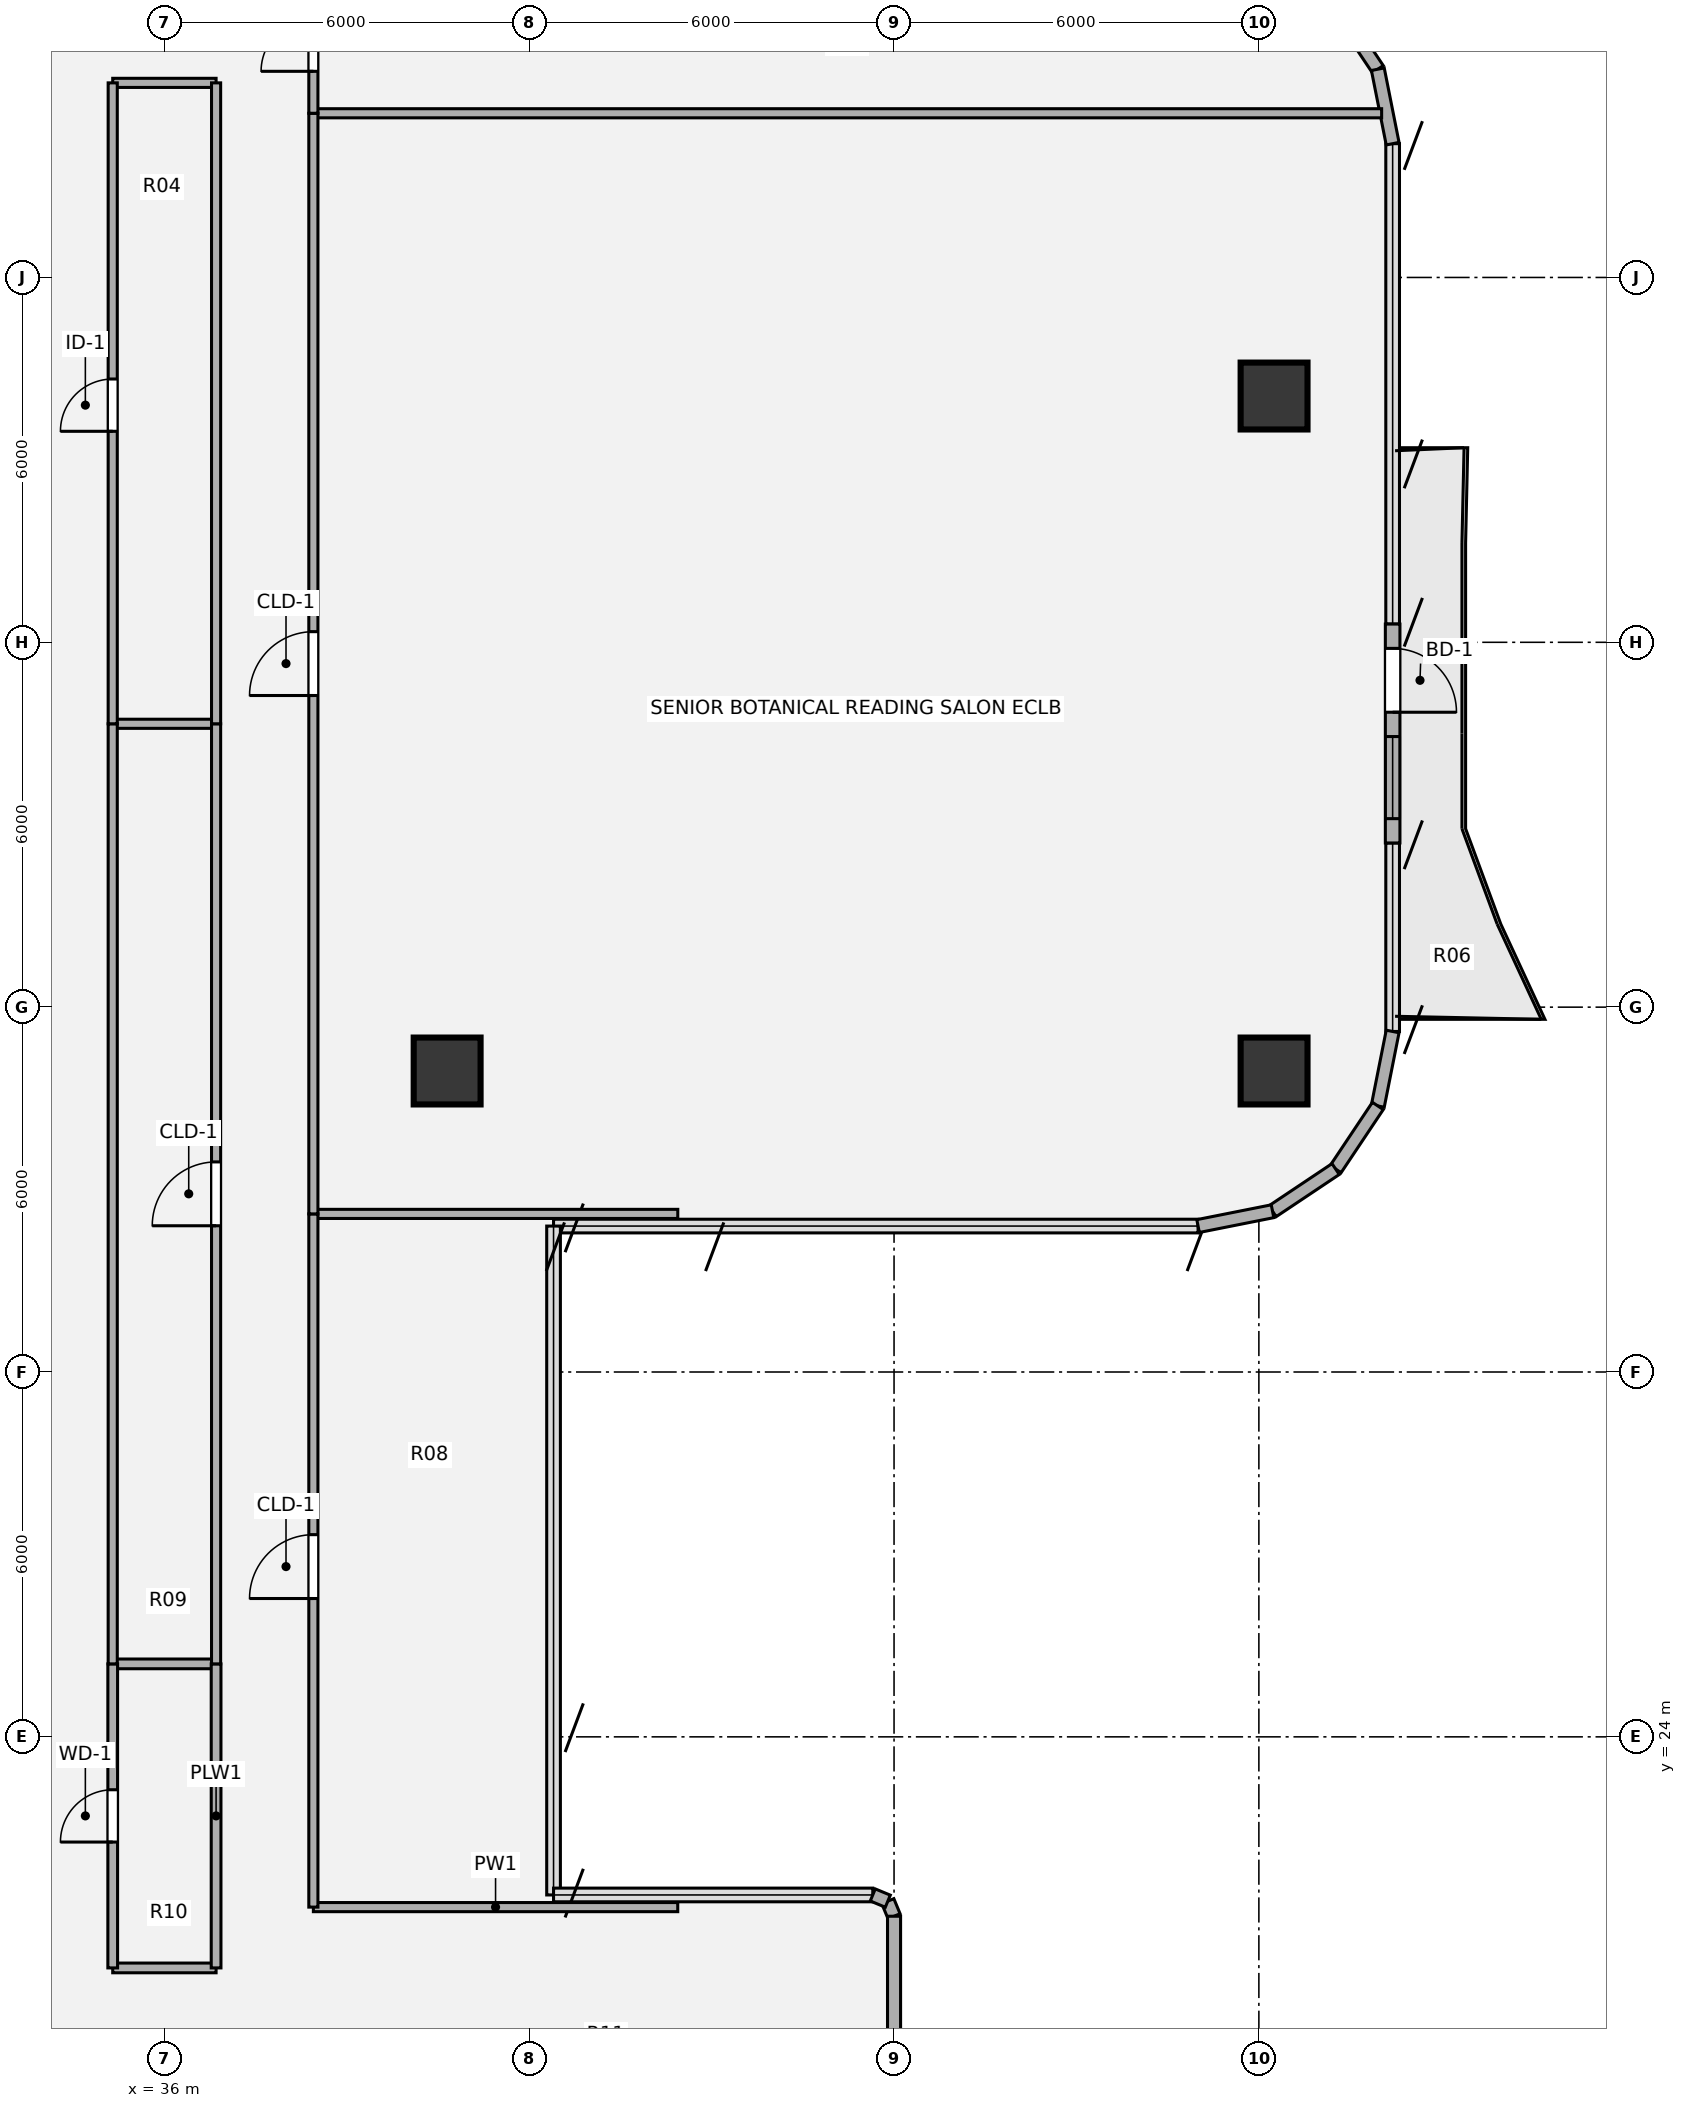
"""IFC4 building model, lengths in metres.
Left out: names, types, materials, properties, quantities, classifications, styles, units other than length and angle.
Written with IfcOpenShell. Run it as: python <this file> out.ifc"""

import sys

from ifc_helpers import new_model, si_unit, direction, frame, frame_2d, origin, origin_2d, place, context, subcontext, project, spatial, rectangle, hollow_circle, extrude, source, transform, mapped, element, fill, save


model = new_model("IFC4")
c1 = context("Model", 3, precision=1e-05, world=origin(), true_north=direction((0.0, 1.0)))
c2 = subcontext(c1, "Body", "Model", "MODEL_VIEW")
j1 = project(units=[si_unit("LENGTHUNIT", "METRE"), si_unit("PLANEANGLEUNIT", "RADIAN")], contexts=[c1])
p1 = place(None, origin())
s1 = spatial("IfcSite", under=j1, at=p1, CompositionType="ELEMENT")
p2 = place(p1, origin())
s2 = spatial("IfcBuilding", under=s1, at=p2, CompositionType="ELEMENT")
p3 = place(p2, frame((0.0, 0.0, 186.66)))
s3 = spatial("IfcBuildingStorey", under=s2, at=p3, CompositionType="ELEMENT", Elevation=186.66)
m1 = source(origin(), c2, "Body", "SweptSolid", [
    extrude(hollow_circle(Radius=0.55, WallThickness=0.04, at=origin_2d()), origin(), (0.0, 0.0, 1.0), 3.78),
])
for number, where, z_axis, x_axis in (
    (1, (54.25, 34.95, 0.0), (0.0, 0.0, 1.0), (1.0, 0.0, 0.0)),
    (2, (54.25, 46.05, 0.0), (0.0, 0.0, 1.0), (1.0, 0.0, 0.0)),
    (3, (40.65, 34.95, 0.0), (0.0, 0.0, 1.0), (1.0, 0.0, 0.0)),
):
    element("IfcColumn", number, at=place(p3, frame(where, z_axis=z_axis, x_axis=x_axis)), inside=s3, PredefinedType="COLUMN", context=c2, shape_type="MappedRepresentation", body=[
        mapped(m1, transform((0.0, 0.0, 0.0), x_axis=(1.0, 0.0, 0.0), y_axis=(0.0, 1.0, 0.0), z_axis=(0.0, 0.0, 1.0), scale=1.0)),
    ])
p4 = place(p3, frame((47.897, 21.298, 0.0), z_axis=(0.0, 0.0, 1.0), x_axis=(0.382673670509, -0.923883575944, 0.0)))
e4 = element("IfcWall", 4, at=p4, inside=s3, PredefinedType="SOLIDWALL", context=c2, shape_type="SweptSolid", body=[
    extrude(rectangle(XDim=0.268, YDim=0.215, at=frame_2d((0.134, 0.0))), origin(), (0.0, 0.0, 1.0), 3.53),
])
p5 = place(p3, frame((48.0, 21.05, 0.0), z_axis=(0.0, 0.0, 1.0), x_axis=(0.0, -1.0, 0.0)))
e5 = element("IfcWall", 5, at=p5, inside=s3, PredefinedType="SOLIDWALL", context=c2, shape_type="SweptSolid", body=[
    extrude(rectangle(XDim=2.695, YDim=0.215, at=frame_2d((1.348, 0.0))), origin(), (0.0, 0.0, 1.0), 2.718),
])
for number, where, z_axis, x_axis in (
    (6, (55.263, 52.463, 0.0), (0.0, 0.0, 1.0), (0.556, -0.831, 0.0)),
    (7, (55.956, 51.425, 0.0), (0.0, 0.0, 1.0), (0.195, -0.981, 0.0)),
):
    element("IfcWall", number, at=place(p3, frame(where, z_axis=z_axis, x_axis=x_axis)), inside=s3, PredefinedType="SOLIDWALL", context=c2, shape_type="SweptSolid", body=[
        extrude(rectangle(XDim=1.249, YDim=0.215, at=frame_2d((0.624, 0.0))), origin(), (0.0, 0.0, 1.0), 3.53),
    ])
p6 = place(p3, frame((56.2, 42.3, 0.0), z_axis=(0.0, 0.0, 1.0), x_axis=(0.0, -1.0, 0.0)))
e8 = element("IfcWall", 8, at=p6, inside=s3, PredefinedType="SOLIDWALL", context=c2, shape_type="SweptSolid", body=[
    extrude(rectangle(XDim=3.6, YDim=0.24, at=frame_2d((1.8, 0.0))), origin(), (0.0, 0.0, 1.0), 3.53),
])
p7 = place(p6, frame((0.4, 0.0, 0.0)))
e9 = element("IfcOpeningElement", 9, at=p7, cuts=e8, PredefinedType="OPENING", context=c2, shape_type="SweptSolid", body=[
    extrude(rectangle(XDim=1.05, YDim=2.15, at=origin_2d()), frame((0.525, 0.13, 1.075), z_axis=(0.0, -1.0, 0.0), x_axis=(1.0, 0.0, 0.0)), (0.0, 0.0, 1.0), 0.26),
])
p8 = place(p6, frame((1.85, 0.0, 0.85)))
e10 = element("IfcOpeningElement", 10, at=p8, cuts=e8, PredefinedType="OPENING", context=c2, shape_type="SweptSolid", body=[
    extrude(rectangle(XDim=1.35, YDim=1.35, at=origin_2d()), frame((0.675, 0.13, 0.675), z_axis=(0.0, -1.0, 0.0), x_axis=(1.0, 0.0, 0.0)), (0.0, 0.0, 1.0), 0.26),
])
for number, where, z_axis, x_axis in (
    (11, (56.2, 35.6, 0.0), (0.0, 0.0, 1.0), (-0.195, -0.981, 0.0)),
    (12, (55.956, 34.375, 0.0), (0.0, 0.0, 1.0), (-0.556, -0.831, 0.0)),
    (13, (55.263, 33.337, 0.0), (0.0, 0.0, 1.0), (-0.831, -0.556, 0.0)),
    (14, (54.225, 32.644, 0.0), (0.0, 0.0, 1.0), (-0.981, -0.195, 0.0)),
):
    element("IfcWall", number, at=place(p3, frame(where, z_axis=z_axis, x_axis=x_axis)), inside=s3, PredefinedType="SOLIDWALL", context=c2, shape_type="SweptSolid", body=[
        extrude(rectangle(XDim=1.249, YDim=0.215, at=frame_2d((0.624, 0.0))), origin(), (0.0, 0.0, 1.0), 3.53),
    ])
p9 = place(p3, frame((47.65, 21.4, 0.0), z_axis=(0.0, 0.0, 1.0), x_axis=(0.924205486139, -0.381895560841, 0.0)))
e15 = element("IfcWall", 15, at=p9, inside=s3, PredefinedType="SOLIDWALL", context=c2, shape_type="SweptSolid", body=[
    extrude(rectangle(XDim=0.268, YDim=0.215, at=frame_2d((0.134, 0.0))), origin(), (0.0, 0.0, 1.0), 3.53),
])
p10 = place(p3, frame((35.15, 20.2, 0.0), z_axis=(0.0, 0.0, 1.0), x_axis=(1.0, 0.0, 0.0)))
e16 = element("IfcWall", 16, at=p10, inside=s3, PredefinedType="PLUMBINGWALL", context=c2, shape_type="SweptSolid", body=[
    extrude(rectangle(XDim=1.7, YDim=0.16, at=frame_2d((0.85, 0.0))), origin(), (0.0, 0.0, 1.0), 3.5),
])
p11 = place(p3, frame((38.45, 21.2, 0.0), z_axis=(0.0, 0.0, 1.0), x_axis=(1.0, 0.0, 0.0)))
e17 = element("IfcWall", 17, at=p11, inside=s3, PredefinedType="PARTITIONING", context=c2, shape_type="SweptSolid", body=[
    extrude(rectangle(XDim=5.993, YDim=0.15, at=frame_2d((2.996, 0.0))), origin(), (0.0, 0.0, 1.0), 3.5),
])
p12 = place(p3, frame((35.15, 25.2, 0.0), z_axis=(0.0, 0.0, 1.0), x_axis=(1.0, 0.0, 0.0)))
e18 = element("IfcWall", 18, at=p12, inside=s3, PredefinedType="PLUMBINGWALL", context=c2, shape_type="SweptSolid", body=[
    extrude(rectangle(XDim=1.7, YDim=0.16, at=frame_2d((0.85, 0.0))), origin(), (0.0, 0.0, 1.0), 3.5),
])
p13 = place(p3, frame((38.45, 32.6, 0.0), z_axis=(0.0, 0.0, 1.0), x_axis=(1.0, 0.0, 0.0)))
e19 = element("IfcWall", 19, at=p13, inside=s3, PredefinedType="PARTITIONING", context=c2, shape_type="SweptSolid", body=[
    extrude(rectangle(XDim=5.993, YDim=0.15, at=frame_2d((2.997, 0.0))), origin(), (0.0, 0.0, 1.0), 3.5),
])
p14 = place(p3, frame((35.15, 40.66, 0.0), z_axis=(0.0, 0.0, 1.0), x_axis=(1.0, 0.0, 0.0)))
e20 = element("IfcWall", 20, at=p14, inside=s3, PredefinedType="PARTITIONING", context=c2, shape_type="SweptSolid", body=[
    extrude(rectangle(XDim=1.7, YDim=0.15, at=frame_2d((0.85, 0.0))), origin(), (0.0, 0.0, 1.0), 3.259),
])
p15 = place(p3, frame((38.45, 50.7, 0.0), z_axis=(0.0, 0.0, 1.0), x_axis=(1.0, 0.0, 0.0)))
e21 = element("IfcWall", 21, at=p15, inside=s3, PredefinedType="PARTITIONING", context=c2, shape_type="SweptSolid", body=[
    extrude(rectangle(XDim=17.569, YDim=0.15, at=frame_2d((8.785, 0.0))), origin(), (0.0, 0.0, 1.0), 3.308),
])
p16 = place(p3, frame((35.15, 51.2, 0.0), z_axis=(0.0, 0.0, 1.0), x_axis=(1.0, 0.0, 0.0)))
e22 = element("IfcWall", 22, at=p16, inside=s3, PredefinedType="PARTITIONING", context=c2, shape_type="SweptSolid", body=[
    extrude(rectangle(XDim=1.7, YDim=0.15, at=frame_2d((0.85, 0.0))), origin(), (0.0, 0.0, 1.0), 3.308),
])
p17 = place(p3, frame((35.15, 20.2, 0.0), z_axis=(0.0, 0.0, 1.0), x_axis=(0.0, 1.0, 0.0)))
e23 = element("IfcWall", 23, at=p17, inside=s3, PredefinedType="PLUMBINGWALL", context=c2, shape_type="SweptSolid", body=[
    extrude(rectangle(XDim=5.0, YDim=0.16, at=frame_2d((2.5, 0.0))), origin(), (0.0, 0.0, 1.0), 3.5),
])
p18 = place(p17, frame((2.07, 0.0, 0.0)))
e24 = element("IfcOpeningElement", 24, at=p18, cuts=e23, PredefinedType="OPENING", context=c2, shape_type="SweptSolid", body=[
    extrude(rectangle(XDim=0.86, YDim=2.1, at=origin_2d()), frame((0.43, 0.09, 1.05), z_axis=(0.0, -1.0, 0.0), x_axis=(1.0, 0.0, 0.0)), (0.0, 0.0, 1.0), 0.18),
])
p19 = place(p3, frame((35.15, 25.2, 0.0), z_axis=(0.0, 0.0, 1.0), x_axis=(0.0, 1.0, 0.0)))
e25 = element("IfcWall", 25, at=p19, inside=s3, PredefinedType="PARTITIONING", context=c2, shape_type="SweptSolid", body=[
    extrude(rectangle(XDim=15.46, YDim=0.15, at=frame_2d((7.73, 0.0))), origin(), (0.0, 0.0, 1.0), 3.5),
])
p20 = place(p3, frame((35.15, 40.66, 0.0), z_axis=(0.0, 0.0, 1.0), x_axis=(0.0, 1.0, 0.0)))
e26 = element("IfcWall", 26, at=p20, inside=s3, PredefinedType="PARTITIONING", context=c2, shape_type="SweptSolid", body=[
    extrude(rectangle(XDim=10.54, YDim=0.15, at=frame_2d((5.27, 0.0))), origin(), (0.0, 0.0, 1.0), 3.5),
])
p21 = place(p20, frame((4.81, 0.0, 0.0)))
e27 = element("IfcOpeningElement", 27, at=p21, cuts=e26, PredefinedType="OPENING", context=c2, shape_type="SweptSolid", body=[
    extrude(rectangle(XDim=0.86, YDim=2.1, at=origin_2d()), frame((0.43, 0.085, 1.05), z_axis=(0.0, -1.0, 0.0), x_axis=(1.0, 0.0, 0.0)), (0.0, 0.0, 1.0), 0.17),
])
p22 = place(p3, frame((36.85, 20.2, 0.0), z_axis=(0.0, 0.0, 1.0), x_axis=(0.0, 1.0, 0.0)))
e28 = element("IfcWall", 28, at=p22, inside=s3, PredefinedType="PLUMBINGWALL", context=c2, shape_type="SweptSolid", body=[
    extrude(rectangle(XDim=5.0, YDim=0.16, at=frame_2d((2.5, 0.0))), origin(), (0.0, 0.0, 1.0), 3.5),
])
p23 = place(p3, frame((36.85, 25.2, 0.0), z_axis=(0.0, 0.0, 1.0), x_axis=(0.0, 1.0, 0.0)))
e29 = element("IfcWall", 29, at=p23, inside=s3, PredefinedType="PARTITIONING", context=c2, shape_type="SweptSolid", body=[
    extrude(rectangle(XDim=15.46, YDim=0.15, at=frame_2d((7.73, 0.0))), origin(), (0.0, 0.0, 1.0), 3.5),
])
p24 = place(p23, frame((7.205, 0.0, 0.0)))
e30 = element("IfcOpeningElement", 30, at=p24, cuts=e29, PredefinedType="OPENING", context=c2, shape_type="SweptSolid", body=[
    extrude(rectangle(XDim=1.05, YDim=2.1, at=origin_2d()), frame((0.525, 0.085, 1.05), z_axis=(0.0, -1.0, 0.0), x_axis=(1.0, 0.0, 0.0)), (0.0, 0.0, 1.0), 0.17),
])
p25 = place(p3, frame((36.85, 40.66, 0.0), z_axis=(0.0, 0.0, 1.0), x_axis=(0.0, 1.0, 0.0)))
e31 = element("IfcWall", 31, at=p25, inside=s3, PredefinedType="PARTITIONING", context=c2, shape_type="SweptSolid", body=[
    extrude(rectangle(XDim=10.54, YDim=0.15, at=frame_2d((5.27, 0.0))), origin(), (0.0, 0.0, 1.0), 3.5),
])
p26 = place(p3, frame((38.45, 21.2, 0.0), z_axis=(0.0, 0.0, 1.0), x_axis=(0.0, 1.0, 0.0)))
e32 = element("IfcWall", 32, at=p26, inside=s3, PredefinedType="PARTITIONING", context=c2, shape_type="SweptSolid", body=[
    extrude(rectangle(XDim=11.4, YDim=0.15, at=frame_2d((5.7, 0.0))), origin(), (0.0, 0.0, 1.0), 3.5),
])
p27 = place(p26, frame((5.075, 0.0, 0.0)))
e33 = element("IfcOpeningElement", 33, at=p27, cuts=e32, PredefinedType="OPENING", context=c2, shape_type="SweptSolid", body=[
    extrude(rectangle(XDim=1.05, YDim=2.1, at=origin_2d()), frame((0.525, 0.085, 1.05), z_axis=(0.0, -1.0, 0.0), x_axis=(1.0, 0.0, 0.0)), (0.0, 0.0, 1.0), 0.17),
])
p28 = place(p3, frame((38.45, 32.6, 0.0), z_axis=(0.0, 0.0, 1.0), x_axis=(0.0, 1.0, 0.0)))
e34 = element("IfcWall", 34, at=p28, inside=s3, PredefinedType="PARTITIONING", context=c2, shape_type="SweptSolid", body=[
    extrude(rectangle(XDim=18.1, YDim=0.15, at=frame_2d((9.05, 0.0))), origin(), (0.0, 0.0, 1.0), 3.5),
])
p29 = place(p28, frame((8.525, 0.0, 0.0)))
e35 = element("IfcOpeningElement", 35, at=p29, cuts=e34, PredefinedType="OPENING", context=c2, shape_type="SweptSolid", body=[
    extrude(rectangle(XDim=1.05, YDim=2.1, at=origin_2d()), frame((0.525, 0.085, 1.05), z_axis=(0.0, -1.0, 0.0), x_axis=(1.0, 0.0, 0.0)), (0.0, 0.0, 1.0), 0.17),
])
p30 = place(p3, frame((38.45, 50.7, 0.0), z_axis=(0.0, 0.0, 1.0), x_axis=(0.0, 1.0, 0.0)))
e36 = element("IfcWall", 36, at=p30, inside=s3, PredefinedType="PARTITIONING", context=c2, shape_type="SweptSolid", body=[
    extrude(rectangle(XDim=2.3, YDim=0.15, at=frame_2d((1.15, 0.0))), origin(), (0.0, 0.0, 1.0), 3.5),
])
p31 = place(p30, frame((0.69, 0.0, 0.0)))
e37 = element("IfcOpeningElement", 37, at=p31, cuts=e36, PredefinedType="OPENING", context=c2, shape_type="SweptSolid", body=[
    extrude(rectangle(XDim=0.86, YDim=2.1, at=origin_2d()), frame((0.43, 0.085, 1.05), z_axis=(0.0, -1.0, 0.0), x_axis=(1.0, 0.0, 0.0)), (0.0, 0.0, 1.0), 0.17),
])
m2 = source(origin(), c2, "Body", "SweptSolid", [
    extrude(rectangle(XDim=1.05, YDim=2.15, at=origin_2d()), frame((0.525, 0.025, 1.075), z_axis=(0.0, -1.0, 0.0), x_axis=(1.0, 0.0, 0.0)), (0.0, 0.0, 1.0), 0.05),
])
p32 = place(p7, origin())
e38 = element("IfcDoor", 38, at=p32, inside=s3, OperationType="SINGLE_SWING_RIGHT", PredefinedType="DOOR", context=c2, shape_type="MappedRepresentation", body=[
    mapped(m2, transform((0.0, 0.0, 0.0), x_axis=(1.0, 0.0, 0.0), y_axis=(0.0, 1.0, 0.0), z_axis=(0.0, 0.0, 1.0), scale=1.0)),
])
fill(e9, e38)
m3 = source(origin(), c2, "Body", "SweptSolid", [
    extrude(rectangle(XDim=1.35, YDim=1.35, at=origin_2d()), frame((0.675, 0.03, 0.675), z_axis=(0.0, -1.0, 0.0), x_axis=(1.0, 0.0, 0.0)), (0.0, 0.0, 1.0), 0.06),
])
p33 = place(p8, origin())
e39 = element("IfcWindow", 39, at=p33, inside=s3, PartitioningType="SINGLE_PANEL", PredefinedType="WINDOW", context=c2, shape_type="MappedRepresentation", body=[
    mapped(m3, transform((0.0, 0.0, 0.0), x_axis=(1.0, 0.0, 0.0), y_axis=(0.0, 1.0, 0.0), z_axis=(0.0, 0.0, 1.0), scale=1.0)),
])
fill(e10, e39)
m4 = source(origin(), c2, "Body", "SweptSolid", [
    extrude(rectangle(XDim=0.86, YDim=2.1, at=origin_2d()), frame((0.43, 0.025, 1.05), z_axis=(0.0, -1.0, 0.0), x_axis=(1.0, 0.0, 0.0)), (0.0, 0.0, 1.0), 0.05),
])
p34 = place(p18, origin())
e40 = element("IfcDoor", 40, at=p34, inside=s3, OperationType="SINGLE_SWING_LEFT", PredefinedType="DOOR", context=c2, shape_type="MappedRepresentation", body=[
    mapped(m4, transform((0.0, 0.0, 0.0), x_axis=(1.0, 0.0, 0.0), y_axis=(0.0, 1.0, 0.0), z_axis=(0.0, 0.0, 1.0), scale=1.0)),
])
fill(e24, e40)
m5 = source(origin(), c2, "Body", "SweptSolid", [
    extrude(rectangle(XDim=0.86, YDim=2.1, at=origin_2d()), frame((0.43, 0.025, 1.05), z_axis=(0.0, -1.0, 0.0), x_axis=(1.0, 0.0, 0.0)), (0.0, 0.0, 1.0), 0.05),
])
p35 = place(p21, origin())
e41 = element("IfcDoor", 41, at=p35, inside=s3, OperationType="SINGLE_SWING_LEFT", PredefinedType="DOOR", context=c2, shape_type="MappedRepresentation", body=[
    mapped(m5, transform((0.0, 0.0, 0.0), x_axis=(1.0, 0.0, 0.0), y_axis=(0.0, 1.0, 0.0), z_axis=(0.0, 0.0, 1.0), scale=1.0)),
])
fill(e27, e41)
m6 = source(origin(), c2, "Body", "SweptSolid", [
    extrude(rectangle(XDim=1.05, YDim=2.1, at=origin_2d()), frame((0.525, 0.025, 1.05), z_axis=(0.0, -1.0, 0.0), x_axis=(1.0, 0.0, 0.0)), (0.0, 0.0, 1.0), 0.05),
])
p36 = place(p24, origin())
e42 = element("IfcDoor", 42, at=p36, inside=s3, OperationType="SINGLE_SWING_LEFT", PredefinedType="DOOR", context=c2, shape_type="MappedRepresentation", body=[
    mapped(m6, transform((0.0, 0.0, 0.0), x_axis=(1.0, 0.0, 0.0), y_axis=(0.0, 1.0, 0.0), z_axis=(0.0, 0.0, 1.0), scale=1.0)),
])
fill(e30, e42)
p37 = place(p27, origin())
e43 = element("IfcDoor", 43, at=p37, inside=s3, OperationType="SINGLE_SWING_LEFT", PredefinedType="DOOR", context=c2, shape_type="MappedRepresentation", body=[
    mapped(m6, transform((0.0, 0.0, 0.0), x_axis=(1.0, 0.0, 0.0), y_axis=(0.0, 1.0, 0.0), z_axis=(0.0, 0.0, 1.0), scale=1.0)),
])
fill(e33, e43)
p38 = place(p29, origin())
e44 = element("IfcDoor", 44, at=p38, inside=s3, OperationType="SINGLE_SWING_LEFT", PredefinedType="DOOR", context=c2, shape_type="MappedRepresentation", body=[
    mapped(m6, transform((0.0, 0.0, 0.0), x_axis=(1.0, 0.0, 0.0), y_axis=(0.0, 1.0, 0.0), z_axis=(0.0, 0.0, 1.0), scale=1.0)),
])
fill(e35, e44)
p39 = place(p31, origin())
e45 = element("IfcDoor", 45, at=p39, inside=s3, OperationType="SINGLE_SWING_LEFT", PredefinedType="DOOR", context=c2, shape_type="MappedRepresentation", body=[
    mapped(m5, transform((0.0, 0.0, 0.0), x_axis=(1.0, 0.0, 0.0), y_axis=(0.0, 1.0, 0.0), z_axis=(0.0, 0.0, 1.0), scale=1.0)),
])
fill(e37, e45)
save(model, sys.argv[1])
